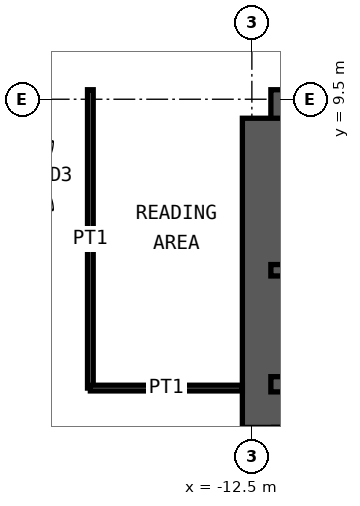
"""IFC4 building model, lengths in metres.
Left out: names, types, materials, properties, quantities, classifications, styles, units other than length and angle.
Written with IfcOpenShell. Run it as: python <this file> out.ifc"""

import sys

from ifc_helpers import new_model, si_unit, direction, frame, frame_2d, origin, place, context, subcontext, project, spatial, rectangle, extrude, element, fill, save


model = new_model("IFC4")
c1 = context("Model", 3, precision=1e-05, world=origin(), true_north=direction((0.0, 1.0)))
c2 = subcontext(c1, "Body", "Model", "MODEL_VIEW")
j1 = project(units=[si_unit("LENGTHUNIT", "METRE"), si_unit("PLANEANGLEUNIT", "RADIAN")], contexts=[c1])
p1 = place(None, origin())
s1 = spatial("IfcSite", under=j1, at=p1, CompositionType="ELEMENT")
p2 = place(p1, origin())
s2 = spatial("IfcBuilding", under=s1, at=p2, CompositionType="ELEMENT")
p3 = place(p2, frame((0.0, 0.0, 132.4)))
s3 = spatial("IfcBuildingStorey", under=s2, at=p3, CompositionType="ELEMENT", Elevation=132.4)
p4 = place(p3, frame((-12.0, 9.0, 0.0), z_axis=(0.0, 0.0, 1.0), x_axis=(1.0, 0.0, 0.0)))
e1 = element("IfcWall", 1, at=p4, inside=s3, PredefinedType="SHEAR", context=c2, shape_type="SweptSolid", body=[
    extrude(rectangle(XDim=24.0, YDim=1.5, at=frame_2d((12.0, 0.0))), origin(), (0.0, 0.0, 1.0), 4.2),
])
p5 = place(p4, frame((10.4, 0.0, 0.0)))
e2 = element("IfcOpeningElement", 2, at=p5, cuts=e1, PredefinedType="OPENING", context=c2, shape_type="SweptSolid", body=[
    extrude(rectangle(XDim=1.0, YDim=2.1, at=frame_2d((0.5, 1.05))), frame((0.0, 0.76, 0.0), z_axis=(0.0, -1.0, 0.0), x_axis=(1.0, 0.0, 0.0)), (0.0, 0.0, 1.0), 1.52),
])
p6 = place(p4, frame((17.6, 0.0, 0.0)))
e3 = element("IfcOpeningElement", 3, at=p6, cuts=e1, PredefinedType="OPENING", context=c2, shape_type="SweptSolid", body=[
    extrude(rectangle(XDim=0.9, YDim=2.1, at=frame_2d((0.45, 1.05))), frame((0.0, 0.76, 0.0), z_axis=(0.0, -1.0, 0.0), x_axis=(1.0, 0.0, 0.0)), (0.0, 0.0, 1.0), 1.52),
])
p7 = place(p4, frame((21.9, 0.0, 0.0)))
e4 = element("IfcOpeningElement", 4, at=p7, cuts=e1, PredefinedType="OPENING", context=c2, shape_type="SweptSolid", body=[
    extrude(rectangle(XDim=0.9, YDim=2.1, at=frame_2d((0.45, 1.05))), frame((0.0, 0.76, 0.0), z_axis=(0.0, -1.0, 0.0), x_axis=(1.0, 0.0, 0.0)), (0.0, 0.0, 1.0), 1.52),
])
p8 = place(p3, frame((-12.0, -9.0, 0.0), z_axis=(0.0, 0.0, 1.0), x_axis=(0.0, 1.0, 0.0)))
e5 = element("IfcWall", 5, at=p8, inside=s3, PredefinedType="SHEAR", context=c2, shape_type="SweptSolid", body=[
    extrude(rectangle(XDim=18.0, YDim=1.5, at=frame_2d((9.0, 0.0))), origin(), (0.0, 0.0, 1.0), 4.2),
])
p9 = place(p8, frame((8.1, 0.0, 0.0)))
e6 = element("IfcOpeningElement", 6, at=p9, cuts=e5, PredefinedType="OPENING", context=c2, shape_type="SweptSolid", body=[
    extrude(rectangle(XDim=1.8, YDim=2.1, at=frame_2d((0.9, 1.05))), frame((0.0, 0.76, 0.0), z_axis=(0.0, -1.0, 0.0), x_axis=(1.0, 0.0, 0.0)), (0.0, 0.0, 1.0), 1.52),
])
p10 = place(p3, frame((-12.0, 5.0, 0.0), z_axis=(0.0, 0.0, 1.0), x_axis=(1.0, 0.0, 0.0)))
e7 = element("IfcWall", 7, at=p10, inside=s3, PredefinedType="SHEAR", context=c2, shape_type="SweptSolid", body=[
    extrude(rectangle(XDim=24.0, YDim=0.3, at=frame_2d((12.0, 0.0))), origin(), (0.0, 0.0, 1.0), 4.2),
])
p11 = place(p3, frame((-12.0, 2.0, 0.0), z_axis=(0.0, 0.0, 1.0), x_axis=(1.0, 0.0, 0.0)))
e8 = element("IfcWall", 8, at=p11, inside=s3, PredefinedType="SHEAR", context=c2, shape_type="SweptSolid", body=[
    extrude(rectangle(XDim=24.0, YDim=0.4, at=frame_2d((12.0, 0.0))), origin(), (0.0, 0.0, 1.0), 4.2),
])
p12 = place(p11, frame((2.4, 0.0, 0.0)))
e9 = element("IfcOpeningElement", 9, at=p12, cuts=e8, PredefinedType="OPENING", context=c2, shape_type="SweptSolid", body=[
    extrude(rectangle(XDim=1.1, YDim=2.1, at=frame_2d((0.55, 1.05))), frame((0.0, 0.21, 0.0), z_axis=(0.0, -1.0, 0.0), x_axis=(1.0, 0.0, 0.0)), (0.0, 0.0, 1.0), 0.42),
])
p13 = place(p11, frame((22.0, 0.0, 0.0)))
e10 = element("IfcOpeningElement", 10, at=p13, cuts=e8, PredefinedType="OPENING", context=c2, shape_type="SweptSolid", body=[
    extrude(rectangle(XDim=1.1, YDim=2.1, at=frame_2d((0.55, 1.05))), frame((0.0, 0.21, 0.0), z_axis=(0.0, -1.0, 0.0), x_axis=(1.0, 0.0, 0.0)), (0.0, 0.0, 1.0), 0.42),
])
p14 = place(p11, frame((10.15, 0.0, 0.0)))
e11 = element("IfcOpeningElement", 11, at=p14, cuts=e8, PredefinedType="OPENING", context=c2, shape_type="SweptSolid", body=[
    extrude(rectangle(XDim=1.0, YDim=2.1, at=frame_2d((0.5, 1.05))), frame((0.0, 0.21, 0.0), z_axis=(0.0, -1.0, 0.0), x_axis=(1.0, 0.0, 0.0)), (0.0, 0.0, 1.0), 0.42),
])
p15 = place(p11, frame((6.9, 0.0, 0.0)))
e12 = element("IfcOpeningElement", 12, at=p15, cuts=e8, PredefinedType="OPENING", context=c2, shape_type="SweptSolid", body=[
    extrude(rectangle(XDim=1.0, YDim=2.1, at=frame_2d((0.5, 1.05))), frame((0.0, 0.21, 0.0), z_axis=(0.0, -1.0, 0.0), x_axis=(1.0, 0.0, 0.0)), (0.0, 0.0, 1.0), 0.42),
])
p16 = place(p11, frame((13.35, 0.0, 0.0)))
e13 = element("IfcOpeningElement", 13, at=p16, cuts=e8, PredefinedType="OPENING", context=c2, shape_type="SweptSolid", body=[
    extrude(rectangle(XDim=1.1, YDim=2.4, at=frame_2d((0.55, 1.2))), frame((0.0, 0.21, 0.0), z_axis=(0.0, -1.0, 0.0), x_axis=(1.0, 0.0, 0.0)), (0.0, 0.0, 1.0), 0.42),
])
p17 = place(p11, frame((16.15, 0.0, 0.0)))
e14 = element("IfcOpeningElement", 14, at=p17, cuts=e8, PredefinedType="OPENING", context=c2, shape_type="SweptSolid", body=[
    extrude(rectangle(XDim=1.1, YDim=2.4, at=frame_2d((0.55, 1.2))), frame((0.0, 0.21, 0.0), z_axis=(0.0, -1.0, 0.0), x_axis=(1.0, 0.0, 0.0)), (0.0, 0.0, 1.0), 0.42),
])
p18 = place(p11, frame((18.95, 0.0, 0.0)))
e15 = element("IfcOpeningElement", 15, at=p18, cuts=e8, PredefinedType="OPENING", context=c2, shape_type="SweptSolid", body=[
    extrude(rectangle(XDim=1.1, YDim=2.4, at=frame_2d((0.55, 1.2))), frame((0.0, 0.21, 0.0), z_axis=(0.0, -1.0, 0.0), x_axis=(1.0, 0.0, 0.0)), (0.0, 0.0, 1.0), 0.42),
])
p19 = place(p3, frame((-16.75, 1.9, 0.0), z_axis=(0.0, 0.0, 1.0), x_axis=(0.0, 1.0, 0.0)))
e16 = element("IfcWall", 16, at=p19, inside=s3, PredefinedType="PARTITIONING", context=c2, shape_type="SweptSolid", body=[
    extrude(rectangle(XDim=7.85, YDim=0.15, at=frame_2d((3.925, 0.0))), origin(), (0.0, 0.0, 1.0), 4.03),
])
p20 = place(p3, frame((-12.75, 1.9, 0.0), z_axis=(0.0, 0.0, 1.0), x_axis=(-1.0, 0.0, 0.0)))
e17 = element("IfcWall", 17, at=p20, inside=s3, PredefinedType="PARTITIONING", context=c2, shape_type="SweptSolid", body=[
    extrude(rectangle(XDim=4.0, YDim=0.15, at=frame_2d((2.0, 0.0))), origin(), (0.0, 0.0, 1.0), 3.33),
])
p21 = place(p9, origin())
e18 = element("IfcDoor", 18, at=p21, inside=s3, OperationType="DOUBLE_DOOR_DOUBLE_SWING", PredefinedType="DOOR", context=c2, shape_type="SweptSolid", body=[
    extrude(rectangle(XDim=1.8, YDim=2.1, at=frame_2d((0.9, 1.05))), frame((0.0, 0.025, 0.0), z_axis=(0.0, -1.0, 0.0), x_axis=(1.0, 0.0, 0.0)), (0.0, 0.0, 1.0), 0.05),
])
fill(e6, e18)
save(model, sys.argv[1])
